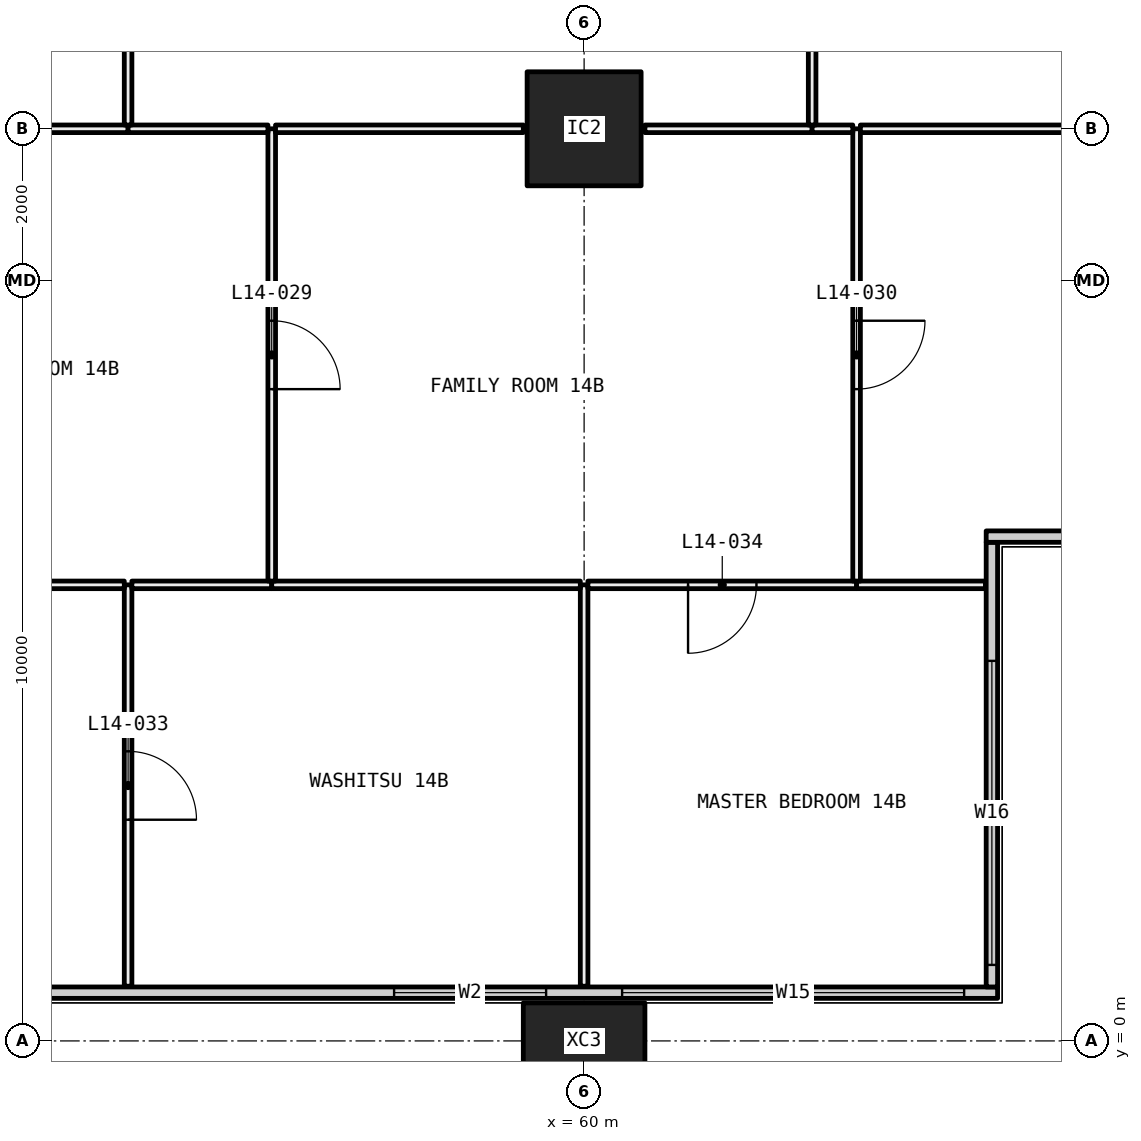
"""IFC4 building model, lengths in metres.
Left out: names, types, materials, properties, quantities, classifications, styles, units other than length and angle.
Written with IfcOpenShell. Run it as: python <this file> out.ifc"""

import sys

from ifc_helpers import new_model, si_unit, direction, frame, frame_2d, origin, origin_2d, place, context, subcontext, project, spatial, rectangle, hollow_rectangle, extrude, element, fill, save


model = new_model("IFC4")
c1 = context("Model", 3, precision=1e-05, world=origin(), true_north=direction((0.0, 1.0)))
c2 = subcontext(c1, "Body", "Model", "MODEL_VIEW")
j1 = project(units=[si_unit("LENGTHUNIT", "METRE"), si_unit("PLANEANGLEUNIT", "RADIAN")], contexts=[c1])
p1 = place(None, origin())
s1 = spatial("IfcSite", under=j1, at=p1, CompositionType="ELEMENT")
p2 = place(p1, origin())
s2 = spatial("IfcBuilding", under=s1, at=p2, CompositionType="ELEMENT")
p3 = place(p2, frame((0.0, 0.0, 61.05)))
s3 = spatial("IfcBuildingStorey", under=s2, at=p3, CompositionType="ELEMENT", Elevation=61.05)
p4 = place(p3, frame((60.0, 0.0, -0.4), z_axis=(0.0, 0.0, 1.0), x_axis=(1.0, 0.0, 0.0)))
e1 = element("IfcColumn", 1, at=p4, inside=s3, PredefinedType="COLUMN", context=c2, shape_type="SweptSolid", body=[
    extrude(hollow_rectangle(XDim=1.6, YDim=1.0, WallThickness=0.065, at=origin_2d()), origin(), (0.0, 0.0, 1.0), 3.45),
])
p5 = place(p3, frame((60.0, 12.0, 0.0), z_axis=(0.0, 0.0, 1.0), x_axis=(1.0, 0.0, 0.0)))
e2 = element("IfcColumn", 2, at=p5, inside=s3, PredefinedType="COLUMN", context=c2, shape_type="SweptSolid", body=[
    extrude(hollow_rectangle(XDim=1.5, YDim=1.5, WallThickness=0.065, at=origin_2d()), origin(), (0.0, 0.0, 1.0), 3.05),
])
p6 = place(p3, frame((6.56, 0.635, 0.0), z_axis=(0.0, 0.0, 1.0), x_axis=(1.0, 0.0, 0.0)))
e3 = element("IfcWall", 3, at=p6, inside=s3, PredefinedType="ELEMENTEDWALL", context=c2, shape_type="SweptSolid", body=[
    extrude(rectangle(XDim=58.88, YDim=0.15, at=frame_2d((29.44, 0.0))), origin(), (0.0, 0.0, 1.0), 3.05),
])
p7 = place(p6, frame((0.44, 0.0, 0.45)))
e4 = element("IfcOpeningElement", 4, at=p7, cuts=e3, PredefinedType="OPENING", context=c2, shape_type="SweptSolid", body=[
    extrude(rectangle(XDim=4.5, YDim=2.55, at=frame_2d((2.25, 1.275))), frame((0.0, 0.085, 0.0), z_axis=(0.0, -1.0, 0.0), x_axis=(1.0, 0.0, 0.0)), (0.0, 0.0, 1.0), 0.17),
])
p8 = place(p6, frame((5.94, 0.0, 0.45)))
e5 = element("IfcOpeningElement", 5, at=p8, cuts=e3, PredefinedType="OPENING", context=c2, shape_type="SweptSolid", body=[
    extrude(rectangle(XDim=3.0, YDim=2.55, at=frame_2d((1.5, 1.275))), frame((0.0, 0.085, 0.0), z_axis=(0.0, -1.0, 0.0), x_axis=(1.0, 0.0, 0.0)), (0.0, 0.0, 1.0), 0.17),
])
p9 = place(p6, frame((13.94, 0.0, 0.45)))
e6 = element("IfcOpeningElement", 6, at=p9, cuts=e3, PredefinedType="OPENING", context=c2, shape_type="SweptSolid", body=[
    extrude(rectangle(XDim=3.0, YDim=2.55, at=frame_2d((1.5, 1.275))), frame((0.0, 0.085, 0.0), z_axis=(0.0, -1.0, 0.0), x_axis=(1.0, 0.0, 0.0)), (0.0, 0.0, 1.0), 0.17),
])
p10 = place(p6, frame((17.94, 0.0, 0.45)))
e7 = element("IfcOpeningElement", 7, at=p10, cuts=e3, PredefinedType="OPENING", context=c2, shape_type="SweptSolid", body=[
    extrude(rectangle(XDim=3.0, YDim=2.55, at=frame_2d((1.5, 1.275))), frame((0.0, 0.085, 0.0), z_axis=(0.0, -1.0, 0.0), x_axis=(1.0, 0.0, 0.0)), (0.0, 0.0, 1.0), 0.17),
])
p11 = place(p6, frame((26.94, 0.0, 0.45)))
e8 = element("IfcOpeningElement", 8, at=p11, cuts=e3, PredefinedType="OPENING", context=c2, shape_type="SweptSolid", body=[
    extrude(rectangle(XDim=2.0, YDim=2.55, at=frame_2d((1.0, 1.275))), frame((0.0, 0.085, 0.0), z_axis=(0.0, -1.0, 0.0), x_axis=(1.0, 0.0, 0.0)), (0.0, 0.0, 1.0), 0.17),
])
p12 = place(p6, frame((29.94, 0.0, 0.45)))
e9 = element("IfcOpeningElement", 9, at=p12, cuts=e3, PredefinedType="OPENING", context=c2, shape_type="SweptSolid", body=[
    extrude(rectangle(XDim=3.0, YDim=2.55, at=frame_2d((1.5, 1.275))), frame((0.0, 0.085, 0.0), z_axis=(0.0, -1.0, 0.0), x_axis=(1.0, 0.0, 0.0)), (0.0, 0.0, 1.0), 0.17),
])
p13 = place(p6, frame((37.94, 0.0, 0.45)))
e10 = element("IfcOpeningElement", 10, at=p13, cuts=e3, PredefinedType="OPENING", context=c2, shape_type="SweptSolid", body=[
    extrude(rectangle(XDim=3.0, YDim=2.55, at=frame_2d((1.5, 1.275))), frame((0.0, 0.085, 0.0), z_axis=(0.0, -1.0, 0.0), x_axis=(1.0, 0.0, 0.0)), (0.0, 0.0, 1.0), 0.17),
])
p14 = place(p6, frame((41.94, 0.0, 0.45)))
e11 = element("IfcOpeningElement", 11, at=p14, cuts=e3, PredefinedType="OPENING", context=c2, shape_type="SweptSolid", body=[
    extrude(rectangle(XDim=3.0, YDim=2.55, at=frame_2d((1.5, 1.275))), frame((0.0, 0.085, 0.0), z_axis=(0.0, -1.0, 0.0), x_axis=(1.0, 0.0, 0.0)), (0.0, 0.0, 1.0), 0.17),
])
p15 = place(p6, frame((50.94, 0.0, 0.45)))
e12 = element("IfcOpeningElement", 12, at=p15, cuts=e3, PredefinedType="OPENING", context=c2, shape_type="SweptSolid", body=[
    extrude(rectangle(XDim=2.0, YDim=2.55, at=frame_2d((1.0, 1.275))), frame((0.0, 0.085, 0.0), z_axis=(0.0, -1.0, 0.0), x_axis=(1.0, 0.0, 0.0)), (0.0, 0.0, 1.0), 0.17),
])
p16 = place(p6, frame((53.94, 0.0, 0.45)))
e13 = element("IfcOpeningElement", 13, at=p16, cuts=e3, PredefinedType="OPENING", context=c2, shape_type="SweptSolid", body=[
    extrude(rectangle(XDim=4.5, YDim=2.55, at=frame_2d((2.25, 1.275))), frame((0.0, 0.085, 0.0), z_axis=(0.0, -1.0, 0.0), x_axis=(1.0, 0.0, 0.0)), (0.0, 0.0, 1.0), 0.17),
])
p17 = place(p3, frame((65.365, 0.71, 0.0), z_axis=(0.0, 0.0, 1.0), x_axis=(0.0, 1.0, 0.0)))
e14 = element("IfcWall", 14, at=p17, inside=s3, PredefinedType="ELEMENTEDWALL", context=c2, shape_type="SweptSolid", body=[
    extrude(rectangle(XDim=5.85, YDim=0.15, at=frame_2d((2.925, 0.0))), origin(), (0.0, 0.0, 1.0), 3.05),
])
p18 = place(p17, frame((0.29, 0.0, 0.45)))
e15 = element("IfcOpeningElement", 15, at=p18, cuts=e14, PredefinedType="OPENING", context=c2, shape_type="SweptSolid", body=[
    extrude(rectangle(XDim=4.0, YDim=2.55, at=frame_2d((2.0, 1.275))), frame((0.0, 0.085, 0.0), z_axis=(0.0, -1.0, 0.0), x_axis=(1.0, 0.0, 0.0)), (0.0, 0.0, 1.0), 0.17),
])
p19 = place(p3, frame((65.29, 6.635, 0.0), z_axis=(0.0, 0.0, 1.0), x_axis=(1.0, 0.0, 0.0)))
e16 = element("IfcWall", 16, at=p19, inside=s3, PredefinedType="ELEMENTEDWALL", context=c2, shape_type="SweptSolid", body=[
    extrude(rectangle(XDim=6.15, YDim=0.15, at=frame_2d((3.075, 0.0))), origin(), (0.0, 0.0, 1.0), 3.05),
])
p20 = place(p19, frame((1.71, 0.0, 0.45)))
e17 = element("IfcOpeningElement", 17, at=p20, cuts=e16, PredefinedType="OPENING", context=c2, shape_type="SweptSolid", body=[
    extrude(rectangle(XDim=4.0, YDim=2.55, at=frame_2d((2.0, 1.275))), frame((0.0, 0.085, 0.0), z_axis=(0.0, -1.0, 0.0), x_axis=(1.0, 0.0, 0.0)), (0.0, 0.0, 1.0), 0.17),
])
p21 = place(p3, frame((54.0, 0.72, 0.0), z_axis=(0.0, 0.0, 1.0), x_axis=(0.0, 1.0, 0.0)))
e18 = element("IfcWall", 18, at=p21, inside=s3, PredefinedType="PARTITIONING", context=c2, shape_type="SweptSolid", body=[
    extrude(rectangle(XDim=5.28, YDim=0.1, at=frame_2d((2.64, 0.0))), origin(), (0.0, 0.0, 1.0), 3.05),
])
p22 = place(p21, frame((2.19, 0.0, 0.0)))
e19 = element("IfcOpeningElement", 19, at=p22, cuts=e18, PredefinedType="OPENING", context=c2, shape_type="SweptSolid", body=[
    extrude(rectangle(XDim=0.9, YDim=2.1, at=frame_2d((0.45, 1.05))), frame((0.0, 0.06, 0.0), z_axis=(0.0, -1.0, 0.0), x_axis=(1.0, 0.0, 0.0)), (0.0, 0.0, 1.0), 0.12),
])
p23 = place(p3, frame((53.95, 6.0, 0.0), z_axis=(0.0, 0.0, 1.0), x_axis=(-1.0, 0.0, 0.0)))
e20 = element("IfcWall", 20, at=p23, inside=s3, PredefinedType="PARTITIONING", context=c2, shape_type="SweptSolid", body=[
    extrude(rectangle(XDim=5.755, YDim=0.1, at=frame_2d((2.877, 0.0))), origin(), (0.0, 0.0, 1.0), 3.05),
])
p24 = place(p23, frame((2.427, 0.0, 0.0)))
e21 = element("IfcOpeningElement", 21, at=p24, cuts=e20, PredefinedType="OPENING", context=c2, shape_type="SweptSolid", body=[
    extrude(rectangle(XDim=0.9, YDim=2.1, at=frame_2d((0.45, 1.05))), frame((0.0, 0.06, 0.0), z_axis=(0.0, -1.0, 0.0), x_axis=(1.0, 0.0, 0.0)), (0.0, 0.0, 1.0), 0.12),
])
p25 = place(p3, frame((60.0, 0.72, 0.0), z_axis=(0.0, 0.0, 1.0), x_axis=(0.0, 1.0, 0.0)))
e22 = element("IfcWall", 22, at=p25, inside=s3, PredefinedType="PARTITIONING", context=c2, shape_type="SweptSolid", body=[
    extrude(rectangle(XDim=5.28, YDim=0.1, at=frame_2d((2.64, 0.0))), origin(), (0.0, 0.0, 1.0), 2.45),
])
p26 = place(p3, frame((55.89, 6.0, 0.0), z_axis=(0.0, 0.0, 1.0), x_axis=(-1.0, 0.0, 0.0)))
e23 = element("IfcWall", 23, at=p26, inside=s3, PredefinedType="PARTITIONING", context=c2, shape_type="SweptSolid", body=[
    extrude(rectangle(XDim=1.84, YDim=0.1, at=frame_2d((0.92, 0.0))), origin(), (0.0, 0.0, 1.0), 3.05),
])
p27 = place(p3, frame((59.95, 6.0, 0.0), z_axis=(0.0, 0.0, 1.0), x_axis=(-1.0, 0.0, 0.0)))
e24 = element("IfcWall", 24, at=p27, inside=s3, PredefinedType="PARTITIONING", context=c2, shape_type="SweptSolid", body=[
    extrude(rectangle(XDim=4.06, YDim=0.1, at=frame_2d((2.03, 0.0))), origin(), (0.0, 0.0, 1.0), 2.45),
])
p28 = place(p3, frame((63.585, 6.0, 0.0), z_axis=(0.0, 0.0, 1.0), x_axis=(-1.0, 0.0, 0.0)))
e25 = element("IfcWall", 25, at=p28, inside=s3, PredefinedType="PARTITIONING", context=c2, shape_type="SweptSolid", body=[
    extrude(rectangle(XDim=3.535, YDim=0.1, at=frame_2d((1.768, 0.0))), origin(), (0.0, 0.0, 1.0), 2.45),
])
p29 = place(p28, frame((1.317, 0.0, 0.0)))
e26 = element("IfcOpeningElement", 26, at=p29, cuts=e25, PredefinedType="OPENING", context=c2, shape_type="SweptSolid", body=[
    extrude(rectangle(XDim=0.9, YDim=2.1, at=frame_2d((0.45, 1.05))), frame((0.0, 0.06, 0.0), z_axis=(0.0, -1.0, 0.0), x_axis=(1.0, 0.0, 0.0)), (0.0, 0.0, 1.0), 0.12),
])
p30 = place(p3, frame((65.28, 6.0, 0.0), z_axis=(0.0, 0.0, 1.0), x_axis=(-1.0, 0.0, 0.0)))
e27 = element("IfcWall", 27, at=p30, inside=s3, PredefinedType="PARTITIONING", context=c2, shape_type="SweptSolid", body=[
    extrude(rectangle(XDim=1.695, YDim=0.1, at=frame_2d((0.848, 0.0))), origin(), (0.0, 0.0, 1.0), 3.05),
])
p31 = place(p3, frame((55.89, 6.05, 0.0), z_axis=(0.0, 0.0, 1.0), x_axis=(0.0, 1.0, 0.0)))
e28 = element("IfcWall", 28, at=p31, inside=s3, PredefinedType="PARTITIONING", context=c2, shape_type="SweptSolid", body=[
    extrude(rectangle(XDim=5.95, YDim=0.1, at=frame_2d((2.975, 0.0))), origin(), (0.0, 0.0, 1.0), 2.45),
])
p32 = place(p31, frame((2.525, 0.0, 0.0)))
e29 = element("IfcOpeningElement", 29, at=p32, cuts=e28, PredefinedType="OPENING", context=c2, shape_type="SweptSolid", body=[
    extrude(rectangle(XDim=0.9, YDim=2.1, at=frame_2d((0.45, 1.05))), frame((0.0, 0.06, 0.0), z_axis=(0.0, -1.0, 0.0), x_axis=(1.0, 0.0, 0.0)), (0.0, 0.0, 1.0), 0.12),
])
p33 = place(p3, frame((54.0, 12.0, 0.0), z_axis=(0.0, 0.0, 1.0), x_axis=(-1.0, 0.0, 0.0)))
e30 = element("IfcWall", 30, at=p33, inside=s3, PredefinedType="PARTITIONING", context=c2, shape_type="SweptSolid", body=[
    extrude(rectangle(XDim=4.5, YDim=0.1, at=frame_2d((2.25, 0.0))), origin(), (0.0, 0.0, 1.0), 2.45),
])
p34 = place(p33, frame((1.8, 0.0, 0.0)))
e31 = element("IfcOpeningElement", 31, at=p34, cuts=e30, PredefinedType="OPENING", context=c2, shape_type="SweptSolid", body=[
    extrude(rectangle(XDim=0.9, YDim=2.1, at=frame_2d((0.45, 1.05))), frame((0.0, 0.06, 0.0), z_axis=(0.0, -1.0, 0.0), x_axis=(1.0, 0.0, 0.0)), (0.0, 0.0, 1.0), 0.12),
])
p35 = place(p3, frame((55.84, 12.0, 0.0), z_axis=(0.0, 0.0, 1.0), x_axis=(-1.0, 0.0, 0.0)))
e32 = element("IfcWall", 32, at=p35, inside=s3, PredefinedType="PARTITIONING", context=c2, shape_type="SweptSolid", body=[
    extrude(rectangle(XDim=1.84, YDim=0.1, at=frame_2d((0.92, 0.0))), origin(), (0.0, 0.0, 1.0), 2.45),
])
p36 = place(p3, frame((63.585, 6.05, 0.0), z_axis=(0.0, 0.0, 1.0), x_axis=(0.0, 1.0, 0.0)))
e33 = element("IfcWall", 33, at=p36, inside=s3, PredefinedType="PARTITIONING", context=c2, shape_type="SweptSolid", body=[
    extrude(rectangle(XDim=5.95, YDim=0.1, at=frame_2d((2.975, 0.0))), origin(), (0.0, 0.0, 1.0), 2.45),
])
p37 = place(p36, frame((2.525, 0.0, 0.0)))
e34 = element("IfcOpeningElement", 34, at=p37, cuts=e33, PredefinedType="OPENING", context=c2, shape_type="SweptSolid", body=[
    extrude(rectangle(XDim=0.9, YDim=2.1, at=frame_2d((0.45, 1.05))), frame((0.0, 0.06, 0.0), z_axis=(0.0, -1.0, 0.0), x_axis=(1.0, 0.0, 0.0)), (0.0, 0.0, 1.0), 0.12),
])
p38 = place(p3, frame((59.2, 12.0, 0.0), z_axis=(0.0, 0.0, 1.0), x_axis=(-1.0, 0.0, 0.0)))
e35 = element("IfcWall", 35, at=p38, inside=s3, PredefinedType="PARTITIONING", context=c2, shape_type="SweptSolid", body=[
    extrude(rectangle(XDim=3.26, YDim=0.1, at=frame_2d((1.63, 0.0))), origin(), (0.0, 0.0, 1.0), 2.45),
])
p39 = place(p3, frame((63.0, 12.0, 0.0), z_axis=(0.0, 0.0, 1.0), x_axis=(-1.0, 0.0, 0.0)))
e36 = element("IfcWall", 36, at=p39, inside=s3, PredefinedType="PARTITIONING", context=c2, shape_type="SweptSolid", body=[
    extrude(rectangle(XDim=2.2, YDim=0.1, at=frame_2d((1.1, 0.0))), origin(), (0.0, 0.0, 1.0), 2.45),
])
p40 = place(p3, frame((63.535, 12.0, 0.0), z_axis=(0.0, 0.0, 1.0), x_axis=(-1.0, 0.0, 0.0)))
e37 = element("IfcWall", 37, at=p40, inside=s3, PredefinedType="PARTITIONING", context=c2, shape_type="SweptSolid", body=[
    extrude(rectangle(XDim=0.535, YDim=0.1, at=frame_2d((0.268, 0.0))), origin(), (0.0, 0.0, 1.0), 2.45),
])
p41 = place(p3, frame((71.28, 12.0, 0.0), z_axis=(0.0, 0.0, 1.0), x_axis=(-1.0, 0.0, 0.0)))
e38 = element("IfcWall", 38, at=p41, inside=s3, PredefinedType="PARTITIONING", context=c2, shape_type="SweptSolid", body=[
    extrude(rectangle(XDim=7.645, YDim=0.1, at=frame_2d((3.823, 0.0))), origin(), (0.0, 0.0, 1.0), 2.45),
])
p42 = place(p41, frame((3.373, 0.0, 0.0)))
e39 = element("IfcOpeningElement", 39, at=p42, cuts=e38, PredefinedType="OPENING", context=c2, shape_type="SweptSolid", body=[
    extrude(rectangle(XDim=0.9, YDim=2.1, at=frame_2d((0.45, 1.05))), frame((0.0, 0.06, 0.0), z_axis=(0.0, -1.0, 0.0), x_axis=(1.0, 0.0, 0.0)), (0.0, 0.0, 1.0), 0.12),
])
p43 = place(p3, frame((54.0, 12.05, 0.0), z_axis=(0.0, 0.0, 1.0), x_axis=(0.0, 1.0, 0.0)))
e40 = element("IfcWall", 40, at=p43, inside=s3, PredefinedType="PARTITIONING", context=c2, shape_type="SweptSolid", body=[
    extrude(rectangle(XDim=5.85, YDim=0.1, at=frame_2d((2.925, 0.0))), origin(), (0.0, 0.0, 1.0), 2.45),
])
p44 = place(p43, frame((2.475, 0.0, 0.0)))
e41 = element("IfcOpeningElement", 41, at=p44, cuts=e40, PredefinedType="OPENING", context=c2, shape_type="SweptSolid", body=[
    extrude(rectangle(XDim=0.9, YDim=2.1, at=frame_2d((0.45, 1.05))), frame((0.0, 0.06, 0.0), z_axis=(0.0, -1.0, 0.0), x_axis=(1.0, 0.0, 0.0)), (0.0, 0.0, 1.0), 0.12),
])
p45 = place(p3, frame((63.0, 12.05, 0.0), z_axis=(0.0, 0.0, 1.0), x_axis=(0.0, 1.0, 0.0)))
e42 = element("IfcWall", 42, at=p45, inside=s3, PredefinedType="PARTITIONING", context=c2, shape_type="SweptSolid", body=[
    extrude(rectangle(XDim=5.85, YDim=0.1, at=frame_2d((2.925, 0.0))), origin(), (0.0, 0.0, 1.0), 2.45),
])
p46 = place(p15, origin())
e43 = element("IfcWindow", 43, at=p46, inside=s3, PartitioningType="SINGLE_PANEL", PredefinedType="WINDOW", context=c2, shape_type="SweptSolid", body=[
    extrude(rectangle(XDim=2.0, YDim=2.55, at=frame_2d((1.0, 1.275))), frame((0.0, 0.03, 0.0), z_axis=(0.0, -1.0, 0.0), x_axis=(1.0, 0.0, 0.0)), (0.0, 0.0, 1.0), 0.06),
])
fill(e12, e43)
p47 = place(p16, origin())
e44 = element("IfcWindow", 44, at=p47, inside=s3, PartitioningType="SINGLE_PANEL", PredefinedType="WINDOW", context=c2, shape_type="SweptSolid", body=[
    extrude(rectangle(XDim=4.5, YDim=2.55, at=frame_2d((2.25, 1.275))), frame((0.0, 0.03, 0.0), z_axis=(0.0, -1.0, 0.0), x_axis=(1.0, 0.0, 0.0)), (0.0, 0.0, 1.0), 0.06),
])
fill(e13, e44)
p48 = place(p18, origin())
e45 = element("IfcWindow", 45, at=p48, inside=s3, PartitioningType="SINGLE_PANEL", PredefinedType="WINDOW", context=c2, shape_type="SweptSolid", body=[
    extrude(rectangle(XDim=4.0, YDim=2.55, at=frame_2d((2.0, 1.275))), frame((0.0, 0.03, 0.0), z_axis=(0.0, -1.0, 0.0), x_axis=(1.0, 0.0, 0.0)), (0.0, 0.0, 1.0), 0.06),
])
fill(e15, e45)
p49 = place(p32, frame((0.9, 0.0, 0.0), x_axis=(-1.0, 0.0, 0.0)))
e46 = element("IfcDoor", 46, at=p49, inside=s3, OperationType="SINGLE_SWING_LEFT", PredefinedType="DOOR", context=c2, shape_type="SweptSolid", body=[
    extrude(rectangle(XDim=0.9, YDim=2.1, at=frame_2d((0.45, 1.05))), frame((0.0, 0.025, 0.0), z_axis=(0.0, -1.0, 0.0), x_axis=(1.0, 0.0, 0.0)), (0.0, 0.0, 1.0), 0.05),
])
fill(e29, e46)
p50 = place(p37, frame((0.9, 0.0, 0.0), x_axis=(-1.0, 0.0, 0.0)))
e47 = element("IfcDoor", 47, at=p50, inside=s3, OperationType="SINGLE_SWING_RIGHT", PredefinedType="DOOR", context=c2, shape_type="SweptSolid", body=[
    extrude(rectangle(XDim=0.9, YDim=2.1, at=frame_2d((0.45, 1.05))), frame((0.0, 0.025, 0.0), z_axis=(0.0, -1.0, 0.0), x_axis=(1.0, 0.0, 0.0)), (0.0, 0.0, 1.0), 0.05),
])
fill(e34, e47)
p51 = place(p22, frame((0.9, 0.0, 0.0), x_axis=(-1.0, 0.0, 0.0)))
e48 = element("IfcDoor", 48, at=p51, inside=s3, OperationType="SINGLE_SWING_LEFT", PredefinedType="DOOR", context=c2, shape_type="SweptSolid", body=[
    extrude(rectangle(XDim=0.9, YDim=2.1, at=frame_2d((0.45, 1.05))), frame((0.0, 0.025, 0.0), z_axis=(0.0, -1.0, 0.0), x_axis=(1.0, 0.0, 0.0)), (0.0, 0.0, 1.0), 0.05),
])
fill(e19, e48)
p52 = place(p29, origin())
e49 = element("IfcDoor", 49, at=p52, inside=s3, OperationType="SINGLE_SWING_LEFT", PredefinedType="DOOR", context=c2, shape_type="SweptSolid", body=[
    extrude(rectangle(XDim=0.9, YDim=2.1, at=frame_2d((0.45, 1.05))), frame((0.0, 0.025, 0.0), z_axis=(0.0, -1.0, 0.0), x_axis=(1.0, 0.0, 0.0)), (0.0, 0.0, 1.0), 0.05),
])
fill(e26, e49)
save(model, sys.argv[1])
